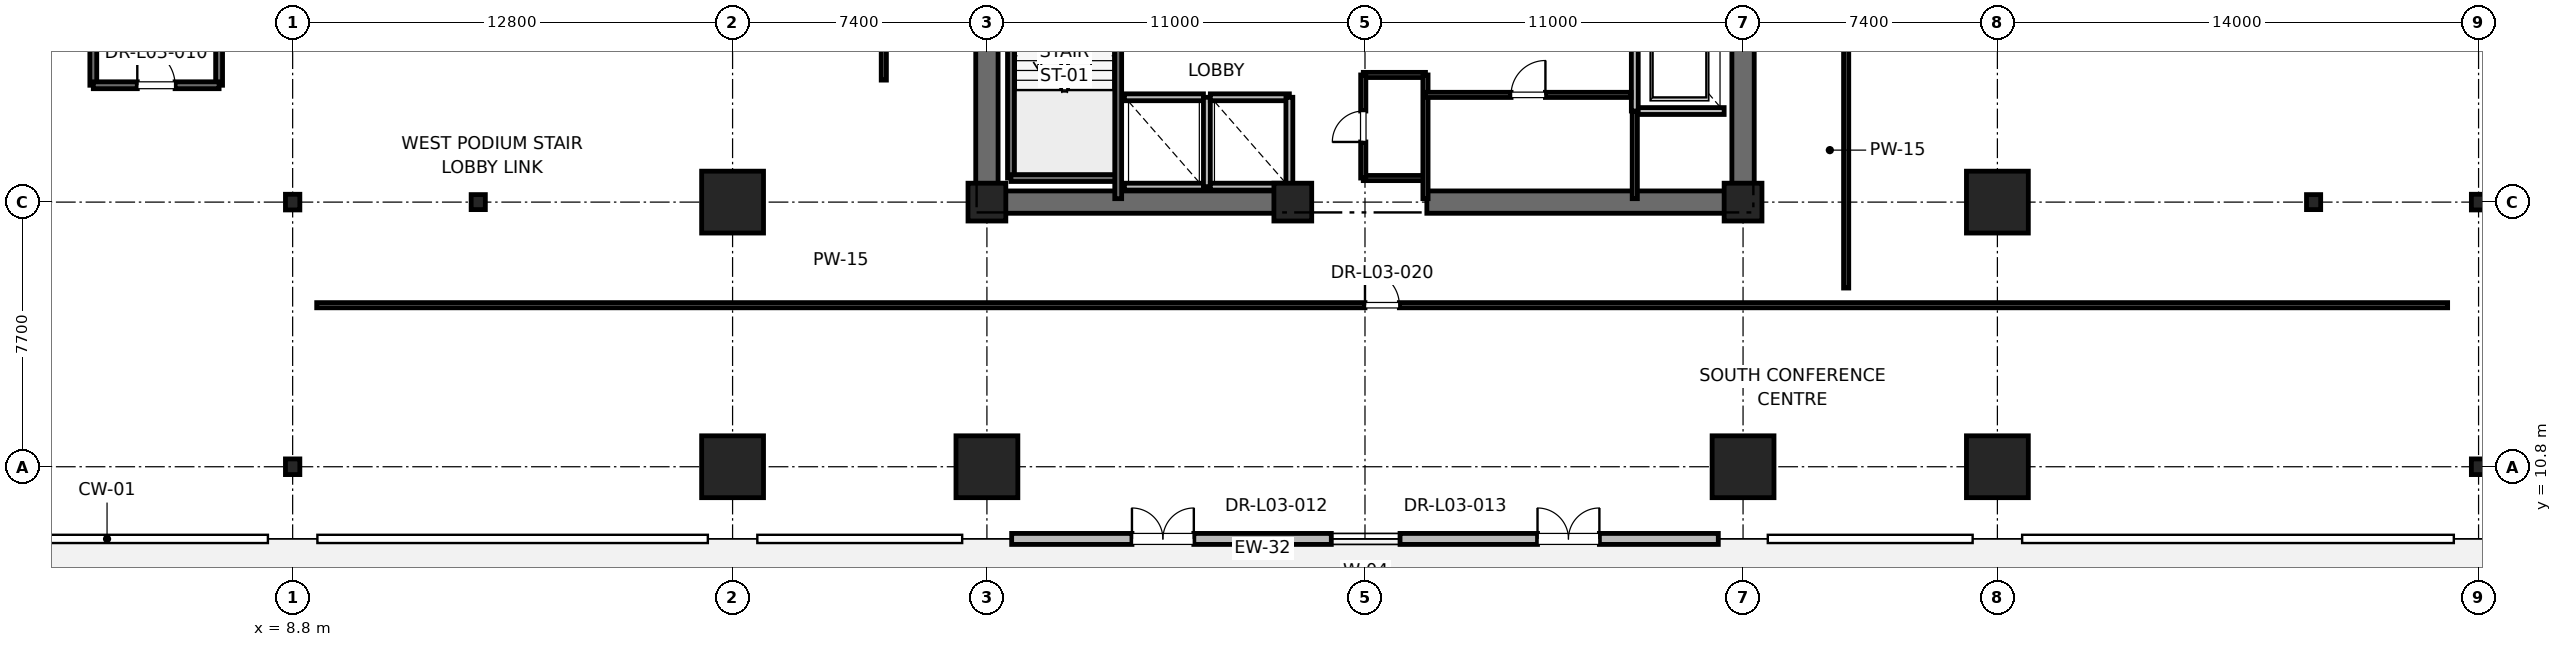
"""IFC4 building model, lengths in metres.
Left out: names, types, materials, properties, quantities, classifications, styles, units other than length and angle.
Written with IfcOpenShell. Run it as: python <this file> out.ifc"""

import sys

from ifc_helpers import new_model, si_unit, direction, frame, frame_2d, origin, origin_2d, place, context, subcontext, project, spatial, rectangle, i_section, extrude, element, fill, save


model = new_model("IFC4")
c1 = context("Model", 3, precision=1e-05, world=origin(), true_north=direction((0.0, 1.0)))
c2 = subcontext(c1, "Body", "Model", "MODEL_VIEW")
j1 = project(units=[si_unit("LENGTHUNIT", "METRE"), si_unit("PLANEANGLEUNIT", "RADIAN")], contexts=[c1])
p1 = place(None, origin())
s1 = spatial("IfcSite", under=j1, at=p1, CompositionType="ELEMENT")
p2 = place(p1, origin())
s2 = spatial("IfcBuilding", under=s1, at=p2, CompositionType="ELEMENT")
p3 = place(p2, frame((0.0, 0.0, 16.4)))
s3 = spatial("IfcBuildingStorey", under=s2, at=p3, CompositionType="ELEMENT", Elevation=16.4)
for number, where, z_axis, x_axis in (
    (1, (29.0, 10.8, 0.0), (0.0, 0.0, 1.0), (1.0, 0.0, 0.0)),
    (2, (51.0, 10.8, 0.0), (0.0, 0.0, 1.0), (1.0, 0.0, 0.0)),
    (3, (21.6, 18.5, 0.0), (0.0, 0.0, 1.0), (1.0, 0.0, 0.0)),
    (4, (58.4, 18.5, 0.0), (0.0, 0.0, 1.0), (1.0, 0.0, 0.0)),
    (5, (21.6, 10.8, 0.0), (0.0, 0.0, 1.0), (1.0, 0.0, 0.0)),
    (6, (58.4, 10.8, 0.0), (0.0, 0.0, 1.0), (1.0, 0.0, 0.0)),
):
    element("IfcColumn", number, at=place(p3, frame(where, z_axis=z_axis, x_axis=x_axis)), inside=s3, PredefinedType="COLUMN", context=c2, shape_type="SweptSolid", body=[
        extrude(rectangle(XDim=1.8, YDim=1.8, at=origin_2d()), origin(), (0.0, 0.0, 1.0), 5.2),
    ])
for number, where, z_axis, x_axis in (
    (7, (14.2, 18.5, 0.0), (0.0, 0.0, 1.0), (1.0, 0.0, 0.0)),
    (8, (67.6, 18.5, 0.0), (0.0, 0.0, 1.0), (1.0, 0.0, 0.0)),
):
    element("IfcColumn", number, at=place(p3, frame(where, z_axis=z_axis, x_axis=x_axis)), inside=s3, PredefinedType="COLUMN", context=c2, shape_type="SweptSolid", body=[
        extrude(i_section(OverallWidth=0.412, OverallDepth=0.437, WebThickness=0.036, FlangeThickness=0.058, FilletRadius=0.015, at=origin_2d()), origin(), (0.0, 0.0, 1.0), 5.2),
    ])
for number, where, z_axis, x_axis in (
    (9, (29.0, 18.5, 0.0), (0.0, 0.0, 1.0), (1.0, 0.0, 0.0)),
    (10, (51.0, 18.5, 0.0), (0.0, 0.0, 1.0), (1.0, 0.0, 0.0)),
    (11, (37.9, 18.5, 0.0), (0.0, 0.0, 1.0), (1.0, 0.0, 0.0)),
):
    element("IfcColumn", number, at=place(p3, frame(where, z_axis=z_axis, x_axis=x_axis)), inside=s3, PredefinedType="PILASTER", context=c2, shape_type="SweptSolid", body=[
        extrude(rectangle(XDim=1.1, YDim=1.1, at=origin_2d()), origin(), (0.0, 0.0, 1.0), 5.2),
    ])
for number, where, z_axis, x_axis in (
    (12, (8.8, 10.8, 0.0), (0.0, 0.0, 1.0), (1.0, 0.0, 0.0)),
    (13, (8.8, 18.5, 0.0), (0.0, 0.0, 1.0), (1.0, 0.0, 0.0)),
    (14, (72.4, 10.8, 0.0), (0.0, 0.0, 1.0), (1.0, 0.0, 0.0)),
    (15, (72.4, 18.5, 0.0), (0.0, 0.0, 1.0), (1.0, 0.0, 0.0)),
):
    element("IfcColumn", number, at=place(p3, frame(where, z_axis=z_axis, x_axis=x_axis)), inside=s3, PredefinedType="COLUMN", context=c2, shape_type="SweptSolid", body=[
        extrude(i_section(OverallWidth=0.418, OverallDepth=0.456, WebThickness=0.042, FlangeThickness=0.067, FilletRadius=0.015, at=origin_2d()), origin(), (0.0, 0.0, 1.0), 5.2),
    ])
for number, where, z_axis, x_axis in (
    (16, (29.0, 18.5, 0.0), (0.0, 0.0, 1.0), (1.0, 0.0, 0.0)),
    (17, (41.8, 18.5, 0.0), (0.0, 0.0, 1.0), (1.0, 0.0, 0.0)),
):
    element("IfcWall", number, at=place(p3, frame(where, z_axis=z_axis, x_axis=x_axis)), inside=s3, PredefinedType="SHEAR", context=c2, shape_type="SweptSolid", body=[
        extrude(rectangle(XDim=9.2, YDim=0.65, at=frame_2d((4.6, 0.0))), origin(), (0.0, 0.0, 1.0), 4.9),
    ])
p4 = place(p3, frame((29.0, 18.5, 0.0), z_axis=(0.0, 0.0, 1.0), x_axis=(0.0, 1.0, 0.0)))
e18 = element("IfcWall", 18, at=p4, inside=s3, PredefinedType="SHEAR", context=c2, shape_type="SweptSolid", body=[
    extrude(rectangle(XDim=8.8, YDim=0.65, at=frame_2d((4.4, 0.0))), origin(), (0.0, 0.0, 1.0), 4.9),
])
p5 = place(p3, frame((51.0, 18.5, 0.0), z_axis=(0.0, 0.0, 1.0), x_axis=(0.0, 1.0, 0.0)))
e19 = element("IfcWall", 19, at=p5, inside=s3, PredefinedType="SHEAR", context=c2, shape_type="SweptSolid", body=[
    extrude(rectangle(XDim=5.8, YDim=0.65, at=frame_2d((2.9, 0.0))), origin(), (0.0, 0.0, 1.0), 4.9),
])
p6 = place(p3, frame((29.72, 8.7, 0.0), z_axis=(0.0, 0.0, 1.0), x_axis=(1.0, 0.0, 0.0)))
e20 = element("IfcWall", 20, at=p6, inside=s3, PredefinedType="SOLIDWALL", context=c2, shape_type="SweptSolid", body=[
    extrude(rectangle(XDim=20.56, YDim=0.32, at=frame_2d((10.28, 0.0))), origin(), (0.0, 0.0, 1.0), 4.9),
])
p7 = place(p6, frame((3.5, 0.0, 0.0)))
e21 = element("IfcOpeningElement", 21, at=p7, cuts=e20, PredefinedType="OPENING", context=c2, shape_type="SweptSolid", body=[
    extrude(rectangle(XDim=1.8, YDim=2.4, at=frame_2d((0.9, 1.2))), frame((0.0, 0.16, 0.0), z_axis=(0.0, -1.0, 0.0), x_axis=(1.0, 0.0, 0.0)), (0.0, 0.0, 1.0), 0.32),
])
p8 = place(p6, frame((9.3, 0.0, 0.9)))
e22 = element("IfcOpeningElement", 22, at=p8, cuts=e20, PredefinedType="OPENING", context=c2, shape_type="SweptSolid", body=[
    extrude(rectangle(XDim=2.0, YDim=2.3, at=frame_2d((1.0, 1.15))), frame((0.0, 0.16, 0.0), z_axis=(0.0, -1.0, 0.0), x_axis=(1.0, 0.0, 0.0)), (0.0, 0.0, 1.0), 0.32),
])
p9 = place(p6, frame((15.3, 0.0, 0.0)))
e23 = element("IfcOpeningElement", 23, at=p9, cuts=e20, PredefinedType="OPENING", context=c2, shape_type="SweptSolid", body=[
    extrude(rectangle(XDim=1.8, YDim=2.4, at=frame_2d((0.9, 1.2))), frame((0.0, 0.16, 0.0), z_axis=(0.0, -1.0, 0.0), x_axis=(1.0, 0.0, 0.0)), (0.0, 0.0, 1.0), 0.32),
])
p10 = place(p3, frame((29.7, 19.2, 0.0), z_axis=(0.0, 0.0, 1.0), x_axis=(0.0, 1.0, 0.0)))
e24 = element("IfcWall", 24, at=p10, inside=s3, PredefinedType="SOLIDWALL", context=c2, shape_type="SweptSolid", body=[
    extrude(rectangle(XDim=8.15, YDim=0.2, at=frame_2d((4.075, 0.0))), origin(), (0.0, 0.0, 1.0), 4.9),
])
p11 = place(p3, frame((29.7, 19.2, 0.0), z_axis=(0.0, 0.0, 1.0), x_axis=(1.0, 0.0, 0.0)))
e25 = element("IfcWall", 25, at=p11, inside=s3, PredefinedType="SOLIDWALL", context=c2, shape_type="SweptSolid", body=[
    extrude(rectangle(XDim=3.12, YDim=0.2, at=frame_2d((1.56, 0.0))), origin(), (0.0, 0.0, 1.0), 4.9),
])
p12 = place(p3, frame((32.82, 18.6, 0.0), z_axis=(0.0, 0.0, 1.0), x_axis=(0.0, 1.0, 0.0)))
e26 = element("IfcWall", 26, at=p12, inside=s3, PredefinedType="SOLIDWALL", context=c2, shape_type="SweptSolid", body=[
    extrude(rectangle(XDim=8.78, YDim=0.2, at=frame_2d((4.39, 0.0))), origin(), (0.0, 0.0, 1.0), 4.9),
])
for number, where, z_axis, x_axis in (
    (27, (3.0, 21.9, 0.0), (0.0, 0.0, 1.0), (0.0, 1.0, 0.0)),
    (28, (6.66, 21.9, 0.0), (0.0, 0.0, 1.0), (0.0, 1.0, 0.0)),
):
    element("IfcWall", number, at=place(p3, frame(where, z_axis=z_axis, x_axis=x_axis)), inside=s3, PredefinedType="SOLIDWALL", context=c2, shape_type="SweptSolid", body=[
        extrude(rectangle(XDim=8.7, YDim=0.2, at=frame_2d((4.35, 0.0))), origin(), (0.0, 0.0, 1.0), 4.9),
    ])
p13 = place(p3, frame((3.0, 21.9, 0.0), z_axis=(0.0, 0.0, 1.0), x_axis=(1.0, 0.0, 0.0)))
e29 = element("IfcWall", 29, at=p13, inside=s3, PredefinedType="SOLIDWALL", context=c2, shape_type="SweptSolid", body=[
    extrude(rectangle(XDim=3.66, YDim=0.2, at=frame_2d((1.83, 0.0))), origin(), (0.0, 0.0, 1.0), 4.9),
])
p14 = place(p13, frame((1.28, 0.0, 0.0)))
e30 = element("IfcOpeningElement", 30, at=p14, cuts=e29, PredefinedType="OPENING", context=c2, shape_type="SweptSolid", body=[
    extrude(rectangle(XDim=1.1, YDim=2.15, at=frame_2d((0.55, 1.075))), frame((0.0, 0.1, 0.0), z_axis=(0.0, -1.0, 0.0), x_axis=(1.0, 0.0, 0.0)), (0.0, 0.0, 1.0), 0.2),
])
p15 = place(p3, frame((47.85, 21.15, 0.0), z_axis=(0.0, 0.0, 1.0), x_axis=(1.0, 0.0, 0.0)))
e31 = element("IfcWall", 31, at=p15, inside=s3, PredefinedType="SOLIDWALL", context=c2, shape_type="SweptSolid", body=[
    extrude(rectangle(XDim=2.6, YDim=0.2, at=frame_2d((1.3, 0.0))), origin(), (0.0, 0.0, 1.0), 4.9),
])
p16 = place(p3, frame((47.85, 24.15, 0.0), z_axis=(0.0, 0.0, 1.0), x_axis=(0.0, -1.0, 0.0)))
e32 = element("IfcWall", 32, at=p16, inside=s3, PredefinedType="SOLIDWALL", context=c2, shape_type="SweptSolid", body=[
    extrude(rectangle(XDim=3.0, YDim=0.2, at=frame_2d((1.5, 0.0))), origin(), (0.0, 0.0, 1.0), 4.9),
])
for number, where, z_axis, x_axis in (
    (33, (33.0, 18.95, 0.0), (0.0, 0.0, 1.0), (1.0, 0.0, 0.0)),
    (34, (35.3, 21.55, 0.0), (0.0, 0.0, 1.0), (-1.0, 0.0, 0.0)),
):
    element("IfcWall", number, at=place(p3, frame(where, z_axis=z_axis, x_axis=x_axis)), inside=s3, PredefinedType="SOLIDWALL", context=c2, shape_type="SweptSolid", body=[
        extrude(rectangle(XDim=2.3, YDim=0.2, at=frame_2d((1.15, 0.0))), origin(), (0.0, 0.0, 1.0), 4.9),
    ])
p17 = place(p3, frame((35.4, 18.95, 0.0), z_axis=(0.0, 0.0, 1.0), x_axis=(0.0, 1.0, 0.0)))
e35 = element("IfcWall", 35, at=p17, inside=s3, PredefinedType="SOLIDWALL", context=c2, shape_type="SweptSolid", body=[
    extrude(rectangle(XDim=2.6, YDim=0.2, at=frame_2d((1.3, 0.0))), origin(), (0.0, 0.0, 1.0), 4.9),
])
p18 = place(p3, frame((35.5, 18.95, 0.0), z_axis=(0.0, 0.0, 1.0), x_axis=(1.0, 0.0, 0.0)))
e36 = element("IfcWall", 36, at=p18, inside=s3, PredefinedType="SOLIDWALL", context=c2, shape_type="SweptSolid", body=[
    extrude(rectangle(XDim=2.3, YDim=0.2, at=frame_2d((1.15, 0.0))), origin(), (0.0, 0.0, 1.0), 3.68),
])
p19 = place(p3, frame((37.8, 21.55, 0.0), z_axis=(0.0, 0.0, 1.0), x_axis=(-1.0, 0.0, 0.0)))
e37 = element("IfcWall", 37, at=p19, inside=s3, PredefinedType="SOLIDWALL", context=c2, shape_type="SweptSolid", body=[
    extrude(rectangle(XDim=2.3, YDim=0.2, at=frame_2d((1.15, 0.0))), origin(), (0.0, 0.0, 1.0), 4.9),
])
p20 = place(p3, frame((37.8, 18.95, 0.0), z_axis=(0.0, 0.0, 1.0), x_axis=(0.0, 1.0, 0.0)))
e38 = element("IfcWall", 38, at=p20, inside=s3, PredefinedType="SOLIDWALL", context=c2, shape_type="SweptSolid", body=[
    extrude(rectangle(XDim=2.6, YDim=0.2, at=frame_2d((1.3, 0.0))), origin(), (0.0, 0.0, 1.0), 3.68),
])
for number, where, z_axis, x_axis in (
    (39, (39.95, 19.2, 0.0), (0.0, 0.0, 1.0), (1.0, 0.0, 0.0)),
    (40, (39.95, 22.2, 0.0), (0.0, 0.0, 1.0), (1.0, 0.0, 0.0)),
):
    element("IfcWall", number, at=place(p3, frame(where, z_axis=z_axis, x_axis=x_axis)), inside=s3, PredefinedType="PARTITIONING", context=c2, shape_type="SweptSolid", body=[
        extrude(rectangle(XDim=1.81, YDim=0.15, at=frame_2d((0.905, 0.0))), origin(), (0.0, 0.0, 1.0), 2.85),
    ])
p21 = place(p3, frame((41.76, 18.6, 0.0), z_axis=(0.0, 0.0, 1.0), x_axis=(0.0, 1.0, 0.0)))
e41 = element("IfcWall", 41, at=p21, inside=s3, PredefinedType="PARTITIONING", context=c2, shape_type="SweptSolid", body=[
    extrude(rectangle(XDim=3.6, YDim=0.15, at=frame_2d((1.8, 0.0))), origin(), (0.0, 0.0, 1.0), 2.85),
])
p22 = place(p3, frame((39.95, 19.2, 0.0), z_axis=(0.0, 0.0, 1.0), x_axis=(0.0, 1.0, 0.0)))
e42 = element("IfcWall", 42, at=p22, inside=s3, PredefinedType="PARTITIONING", context=c2, shape_type="SweptSolid", body=[
    extrude(rectangle(XDim=3.0, YDim=0.15, at=frame_2d((1.5, 0.0))), origin(), (0.0, 0.0, 1.0), 2.85),
])
p23 = place(p22, frame((1.05, 0.0, 0.0)))
e43 = element("IfcOpeningElement", 43, at=p23, cuts=e42, PredefinedType="OPENING", context=c2, shape_type="SweptSolid", body=[
    extrude(rectangle(XDim=0.9, YDim=2.1, at=frame_2d((0.45, 1.05))), frame((0.0, 0.075, 0.0), z_axis=(0.0, -1.0, 0.0), x_axis=(1.0, 0.0, 0.0)), (0.0, 0.0, 1.0), 0.15),
])
p24 = place(p3, frame((47.85, 18.6, 0.0), z_axis=(0.0, 0.0, 1.0), x_axis=(0.0, 1.0, 0.0)))
e44 = element("IfcWall", 44, at=p24, inside=s3, PredefinedType="PARTITIONING", context=c2, shape_type="SweptSolid", body=[
    extrude(rectangle(XDim=2.54, YDim=0.15, at=frame_2d((1.27, 0.0))), origin(), (0.0, 0.0, 1.0), 2.85),
])
p25 = place(p3, frame((41.76, 21.62, 0.0), z_axis=(0.0, 0.0, 1.0), x_axis=(1.0, 0.0, 0.0)))
e45 = element("IfcWall", 45, at=p25, inside=s3, PredefinedType="PARTITIONING", context=c2, shape_type="SweptSolid", body=[
    extrude(rectangle(XDim=5.98, YDim=0.15, at=frame_2d((2.99, 0.0))), origin(), (0.0, 0.0, 1.0), 2.85),
])
p26 = place(p25, frame((2.49, 0.0, 0.0)))
e46 = element("IfcOpeningElement", 46, at=p26, cuts=e45, PredefinedType="OPENING", context=c2, shape_type="SweptSolid", body=[
    extrude(rectangle(XDim=1.0, YDim=2.15, at=frame_2d((0.5, 1.075))), frame((0.0, 0.075, 0.0), z_axis=(0.0, -1.0, 0.0), x_axis=(1.0, 0.0, 0.0)), (0.0, 0.0, 1.0), 0.15),
])
p27 = place(p3, frame((9.5, 15.5, 0.0), z_axis=(0.0, 0.0, 1.0), x_axis=(1.0, 0.0, 0.0)))
e47 = element("IfcWall", 47, at=p27, inside=s3, PredefinedType="PARTITIONING", context=c2, shape_type="SweptSolid", body=[
    extrude(rectangle(XDim=62.0, YDim=0.15, at=frame_2d((31.0, 0.0))), origin(), (0.0, 0.0, 1.0), 2.85),
])
p28 = place(p27, frame((30.5, 0.0, 0.0)))
e48 = element("IfcOpeningElement", 48, at=p28, cuts=e47, PredefinedType="OPENING", context=c2, shape_type="SweptSolid", body=[
    extrude(rectangle(XDim=1.0, YDim=2.15, at=frame_2d((0.5, 1.075))), frame((0.0, 0.075, 0.0), z_axis=(0.0, -1.0, 0.0), x_axis=(1.0, 0.0, 0.0)), (0.0, 0.0, 1.0), 0.15),
])
p29 = place(p3, frame((26.0, 22.05, 0.0), z_axis=(0.0, 0.0, 1.0), x_axis=(0.0, 1.0, 0.0)))
e49 = element("IfcWall", 49, at=p29, inside=s3, PredefinedType="PARTITIONING", context=c2, shape_type="SweptSolid", body=[
    extrude(rectangle(XDim=16.95, YDim=0.15, at=frame_2d((8.475, 0.0))), origin(), (0.0, 0.0, 1.0), 2.85),
])
p30 = place(p29, frame((6.675, 0.0, 0.0)))
e50 = element("IfcOpeningElement", 50, at=p30, cuts=e49, PredefinedType="OPENING", context=c2, shape_type="SweptSolid", body=[
    extrude(rectangle(XDim=1.0, YDim=2.15, at=frame_2d((0.5, 1.075))), frame((0.0, 0.075, 0.0), z_axis=(0.0, -1.0, 0.0), x_axis=(1.0, 0.0, 0.0)), (0.0, 0.0, 1.0), 0.15),
])
p31 = place(p3, frame((54.0, 16.0, 0.0), z_axis=(0.0, 0.0, 1.0), x_axis=(0.0, 1.0, 0.0)))
e51 = element("IfcWall", 51, at=p31, inside=s3, PredefinedType="PARTITIONING", context=c2, shape_type="SweptSolid", body=[
    extrude(rectangle(XDim=14.45, YDim=0.15, at=frame_2d((7.225, 0.0))), origin(), (0.0, 0.0, 1.0), 2.85),
])
p32 = place(p31, frame((8.025, 0.0, 0.0)))
e52 = element("IfcOpeningElement", 52, at=p32, cuts=e51, PredefinedType="OPENING", context=c2, shape_type="SweptSolid", body=[
    extrude(rectangle(XDim=1.0, YDim=2.15, at=frame_2d((0.5, 1.075))), frame((0.0, 0.075, 0.0), z_axis=(0.0, -1.0, 0.0), x_axis=(1.0, 0.0, 0.0)), (0.0, 0.0, 1.0), 0.15),
])
p33 = place(p7, origin())
e53 = element("IfcDoor", 53, at=p33, inside=s3, OperationType="DOUBLE_DOOR_SINGLE_SWING", PredefinedType="DOOR", context=c2, shape_type="SweptSolid", body=[
    extrude(rectangle(XDim=1.8, YDim=2.4, at=frame_2d((0.9, 1.2))), frame((0.0, 0.025, 0.0), z_axis=(0.0, -1.0, 0.0), x_axis=(1.0, 0.0, 0.0)), (0.0, 0.0, 1.0), 0.05),
])
fill(e21, e53)
p34 = place(p8, origin())
e54 = element("IfcWindow", 54, at=p34, inside=s3, PartitioningType="SINGLE_PANEL", PredefinedType="WINDOW", context=c2, shape_type="SweptSolid", body=[
    extrude(rectangle(XDim=2.0, YDim=2.3, at=frame_2d((1.0, 1.15))), frame((0.0, 0.03, 0.0), z_axis=(0.0, -1.0, 0.0), x_axis=(1.0, 0.0, 0.0)), (0.0, 0.0, 1.0), 0.06),
])
fill(e22, e54)
p35 = place(p9, origin())
e55 = element("IfcDoor", 55, at=p35, inside=s3, OperationType="DOUBLE_DOOR_SINGLE_SWING", PredefinedType="DOOR", context=c2, shape_type="SweptSolid", body=[
    extrude(rectangle(XDim=1.8, YDim=2.4, at=frame_2d((0.9, 1.2))), frame((0.0, 0.025, 0.0), z_axis=(0.0, -1.0, 0.0), x_axis=(1.0, 0.0, 0.0)), (0.0, 0.0, 1.0), 0.05),
])
fill(e23, e55)
p36 = place(p14, origin())
e56 = element("IfcDoor", 56, at=p36, inside=s3, OperationType="SINGLE_SWING_LEFT", PredefinedType="DOOR", context=c2, shape_type="SweptSolid", body=[
    extrude(rectangle(XDim=1.1, YDim=2.15, at=frame_2d((0.55, 1.075))), frame((0.0, 0.025, 0.0), z_axis=(0.0, -1.0, 0.0), x_axis=(1.0, 0.0, 0.0)), (0.0, 0.0, 1.0), 0.05),
])
fill(e30, e56)
p37 = place(p23, origin())
e57 = element("IfcDoor", 57, at=p37, inside=s3, OperationType="SINGLE_SWING_LEFT", PredefinedType="DOOR", context=c2, shape_type="SweptSolid", body=[
    extrude(rectangle(XDim=0.9, YDim=2.1, at=frame_2d((0.45, 1.05))), frame((0.0, 0.025, 0.0), z_axis=(0.0, -1.0, 0.0), x_axis=(1.0, 0.0, 0.0)), (0.0, 0.0, 1.0), 0.05),
])
fill(e43, e57)
p38 = place(p26, origin())
e58 = element("IfcDoor", 58, at=p38, inside=s3, OperationType="SINGLE_SWING_RIGHT", PredefinedType="DOOR", context=c2, shape_type="SweptSolid", body=[
    extrude(rectangle(XDim=1.0, YDim=2.15, at=frame_2d((0.5, 1.075))), frame((0.0, 0.025, 0.0), z_axis=(0.0, -1.0, 0.0), x_axis=(1.0, 0.0, 0.0)), (0.0, 0.0, 1.0), 0.05),
])
fill(e46, e58)
p39 = place(p28, origin())
e59 = element("IfcDoor", 59, at=p39, inside=s3, OperationType="SINGLE_SWING_LEFT", PredefinedType="DOOR", context=c2, shape_type="SweptSolid", body=[
    extrude(rectangle(XDim=1.0, YDim=2.15, at=frame_2d((0.5, 1.075))), frame((0.0, 0.025, 0.0), z_axis=(0.0, -1.0, 0.0), x_axis=(1.0, 0.0, 0.0)), (0.0, 0.0, 1.0), 0.05),
])
fill(e48, e59)
save(model, sys.argv[1])
